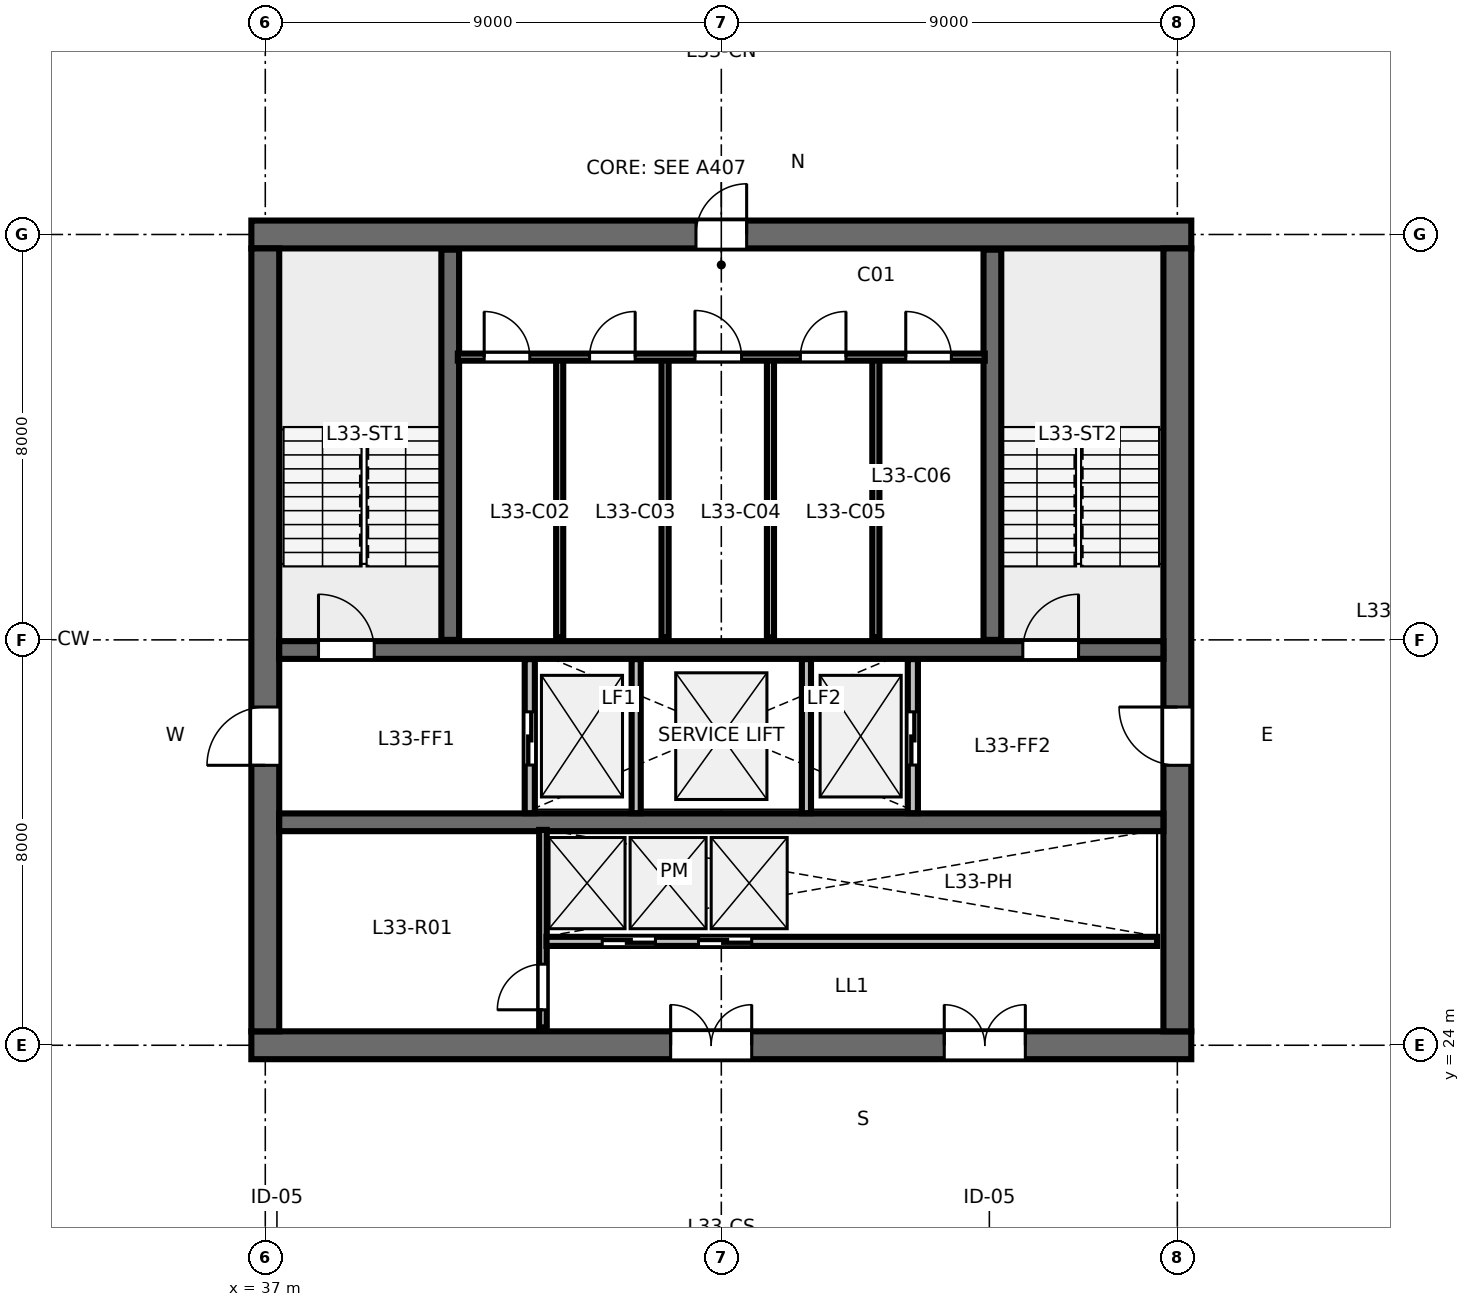
"""IFC4 building model, lengths in metres.
Left out: names, types, materials, properties, quantities, classifications, styles, units other than length and angle.
Written with IfcOpenShell. Run it as: python <this file> out.ifc"""

import sys

from ifc_helpers import new_model, si_unit, direction, frame, frame_2d, origin, place, context, subcontext, project, spatial, rectangle, extrude, element, fill, save


model = new_model("IFC4")
c1 = context("Model", 3, precision=1e-05, world=origin(), true_north=direction((0.0, 1.0)))
c2 = subcontext(c1, "Body", "Model", "MODEL_VIEW")
j1 = project(units=[si_unit("LENGTHUNIT", "METRE"), si_unit("PLANEANGLEUNIT", "RADIAN")], contexts=[c1])
p1 = place(None, origin())
s1 = spatial("IfcSite", under=j1, at=p1, CompositionType="ELEMENT")
p2 = place(p1, origin())
s2 = spatial("IfcBuilding", under=s1, at=p2, CompositionType="ELEMENT")
p3 = place(p2, frame((0.0, 0.0, 127.6)))
s3 = spatial("IfcBuildingStorey", under=s2, at=p3, CompositionType="ELEMENT", Elevation=127.6)
p4 = place(p3, frame((36.725, 24.0, 0.0), z_axis=(0.0, 0.0, 1.0), x_axis=(1.0, 0.0, 0.0)))
e1 = element("IfcWall", 1, at=p4, inside=s3, PredefinedType="SHEAR", context=c2, shape_type="SweptSolid", body=[
    extrude(rectangle(XDim=18.55, YDim=0.55, at=frame_2d((9.275, 0.0))), origin(), (0.0, 0.0, 1.0), 3.36),
])
p5 = place(p4, frame((8.275, 0.0, 0.0)))
e2 = element("IfcOpeningElement", 2, at=p5, cuts=e1, PredefinedType="OPENING", context=c2, shape_type="SweptSolid", body=[
    extrude(rectangle(XDim=1.6, YDim=2.15, at=frame_2d((0.8, 1.075))), frame((0.0, 0.285, 0.0), z_axis=(0.0, -1.0, 0.0), x_axis=(1.0, 0.0, 0.0)), (0.0, 0.0, 1.0), 0.57),
])
p6 = place(p4, frame((13.675, 0.0, 0.0)))
e3 = element("IfcOpeningElement", 3, at=p6, cuts=e1, PredefinedType="OPENING", context=c2, shape_type="SweptSolid", body=[
    extrude(rectangle(XDim=1.6, YDim=2.15, at=frame_2d((0.8, 1.075))), frame((0.0, 0.285, 0.0), z_axis=(0.0, -1.0, 0.0), x_axis=(1.0, 0.0, 0.0)), (0.0, 0.0, 1.0), 0.57),
])
p7 = place(p3, frame((36.725, 40.0, 0.0), z_axis=(0.0, 0.0, 1.0), x_axis=(1.0, 0.0, 0.0)))
e4 = element("IfcWall", 4, at=p7, inside=s3, PredefinedType="SHEAR", context=c2, shape_type="SweptSolid", body=[
    extrude(rectangle(XDim=18.55, YDim=0.55, at=frame_2d((9.275, 0.0))), origin(), (0.0, 0.0, 1.0), 3.36),
])
p8 = place(p7, frame((8.775, 0.0, 0.0)))
e5 = element("IfcOpeningElement", 5, at=p8, cuts=e4, PredefinedType="OPENING", context=c2, shape_type="SweptSolid", body=[
    extrude(rectangle(XDim=1.0, YDim=2.15, at=frame_2d((0.5, 1.075))), frame((0.0, 0.285, 0.0), z_axis=(0.0, -1.0, 0.0), x_axis=(1.0, 0.0, 0.0)), (0.0, 0.0, 1.0), 0.57),
])
p9 = place(p3, frame((37.0, 24.275, 0.0), z_axis=(0.0, 0.0, 1.0), x_axis=(0.0, 1.0, 0.0)))
e6 = element("IfcWall", 6, at=p9, inside=s3, PredefinedType="SHEAR", context=c2, shape_type="SweptSolid", body=[
    extrude(rectangle(XDim=15.45, YDim=0.55, at=frame_2d((7.725, 0.0))), origin(), (0.0, 0.0, 1.0), 3.36),
])
p10 = place(p9, frame((5.25, 0.0, 0.0)))
e7 = element("IfcOpeningElement", 7, at=p10, cuts=e6, PredefinedType="OPENING", context=c2, shape_type="SweptSolid", body=[
    extrude(rectangle(XDim=1.15, YDim=2.15, at=frame_2d((0.575, 1.075))), frame((0.0, 0.285, 0.0), z_axis=(0.0, -1.0, 0.0), x_axis=(1.0, 0.0, 0.0)), (0.0, 0.0, 1.0), 0.57),
])
p11 = place(p3, frame((55.0, 24.275, 0.0), z_axis=(0.0, 0.0, 1.0), x_axis=(0.0, 1.0, 0.0)))
e8 = element("IfcWall", 8, at=p11, inside=s3, PredefinedType="SHEAR", context=c2, shape_type="SweptSolid", body=[
    extrude(rectangle(XDim=15.45, YDim=0.55, at=frame_2d((7.725, 0.0))), origin(), (0.0, 0.0, 1.0), 3.36),
])
p12 = place(p11, frame((5.25, 0.0, 0.0)))
e9 = element("IfcOpeningElement", 9, at=p12, cuts=e8, PredefinedType="OPENING", context=c2, shape_type="SweptSolid", body=[
    extrude(rectangle(XDim=1.15, YDim=2.15, at=frame_2d((0.575, 1.075))), frame((0.0, 0.285, 0.0), z_axis=(0.0, -1.0, 0.0), x_axis=(1.0, 0.0, 0.0)), (0.0, 0.0, 1.0), 0.57),
])
p13 = place(p3, frame((37.275, 31.8, 0.0), z_axis=(0.0, 0.0, 1.0), x_axis=(1.0, 0.0, 0.0)))
e10 = element("IfcWall", 10, at=p13, inside=s3, PredefinedType="SHEAR", context=c2, shape_type="SweptSolid", body=[
    extrude(rectangle(XDim=17.45, YDim=0.35, at=frame_2d((8.725, 0.0))), origin(), (0.0, 0.0, 1.0), 3.36),
])
p14 = place(p13, frame((0.775, 0.0, 0.0)))
e11 = element("IfcOpeningElement", 11, at=p14, cuts=e10, PredefinedType="OPENING", context=c2, shape_type="SweptSolid", body=[
    extrude(rectangle(XDim=1.1, YDim=2.15, at=frame_2d((0.55, 1.075))), frame((0.0, 0.185, 0.0), z_axis=(0.0, -1.0, 0.0), x_axis=(1.0, 0.0, 0.0)), (0.0, 0.0, 1.0), 0.37),
])
p15 = place(p13, frame((14.675, 0.0, 0.0)))
e12 = element("IfcOpeningElement", 12, at=p15, cuts=e10, PredefinedType="OPENING", context=c2, shape_type="SweptSolid", body=[
    extrude(rectangle(XDim=1.1, YDim=2.15, at=frame_2d((0.55, 1.075))), frame((0.0, 0.185, 0.0), z_axis=(0.0, -1.0, 0.0), x_axis=(1.0, 0.0, 0.0)), (0.0, 0.0, 1.0), 0.37),
])
p16 = place(p3, frame((37.275, 28.4, 0.0), z_axis=(0.0, 0.0, 1.0), x_axis=(1.0, 0.0, 0.0)))
e13 = element("IfcWall", 13, at=p16, inside=s3, PredefinedType="SHEAR", context=c2, shape_type="SweptSolid", body=[
    extrude(rectangle(XDim=17.45, YDim=0.35, at=frame_2d((8.725, 0.0))), origin(), (0.0, 0.0, 1.0), 3.36),
])
for number, where, z_axis, x_axis in (
    (14, (40.65, 32.0, 0.0), (0.0, 0.0, 1.0), (0.0, 1.0, 0.0)),
    (15, (51.35, 32.0, 0.0), (0.0, 0.0, 1.0), (0.0, 1.0, 0.0)),
):
    element("IfcWall", number, at=place(p3, frame(where, z_axis=z_axis, x_axis=x_axis)), inside=s3, PredefinedType="SHEAR", context=c2, shape_type="SweptSolid", body=[
        extrude(rectangle(XDim=7.7, YDim=0.35, at=frame_2d((3.85, 0.0))), origin(), (0.0, 0.0, 1.0), 3.6),
    ])
for number, where, z_axis, x_axis in (
    (16, (42.81, 32.05, 0.0), (0.0, 0.0, 1.0), (0.0, 1.0, 0.0)),
    (17, (44.89, 32.05, 0.0), (0.0, 0.0, 1.0), (0.0, 1.0, 0.0)),
    (18, (46.97, 32.05, 0.0), (0.0, 0.0, 1.0), (0.0, 1.0, 0.0)),
    (19, (49.05, 32.05, 0.0), (0.0, 0.0, 1.0), (0.0, 1.0, 0.0)),
):
    element("IfcWall", number, at=place(p3, frame(where, z_axis=z_axis, x_axis=x_axis)), inside=s3, PredefinedType="PARTITIONING", context=c2, shape_type="SweptSolid", body=[
        extrude(rectangle(XDim=5.5, YDim=0.14, at=frame_2d((2.75, 0.0))), origin(), (0.0, 0.0, 1.0), 3.36),
    ])
p17 = place(p3, frame((40.8, 37.58, 0.0), z_axis=(0.0, 0.0, 1.0), x_axis=(1.0, 0.0, 0.0)))
e20 = element("IfcWall", 20, at=p17, inside=s3, PredefinedType="PARTITIONING", context=c2, shape_type="SweptSolid", body=[
    extrude(rectangle(XDim=10.4, YDim=0.14, at=frame_2d((5.2, 0.0))), origin(), (0.0, 0.0, 1.0), 3.36),
])
p18 = place(p17, frame((0.52, 0.0, 0.0)))
e21 = element("IfcOpeningElement", 21, at=p18, cuts=e20, PredefinedType="OPENING", context=c2, shape_type="SweptSolid", body=[
    extrude(rectangle(XDim=0.9, YDim=2.15, at=frame_2d((0.45, 1.075))), frame((0.0, 0.08, 0.0), z_axis=(0.0, -1.0, 0.0), x_axis=(1.0, 0.0, 0.0)), (0.0, 0.0, 1.0), 0.16),
])
p19 = place(p17, frame((2.6, 0.0, 0.0)))
e22 = element("IfcOpeningElement", 22, at=p19, cuts=e20, PredefinedType="OPENING", context=c2, shape_type="SweptSolid", body=[
    extrude(rectangle(XDim=0.9, YDim=2.15, at=frame_2d((0.45, 1.075))), frame((0.0, 0.08, 0.0), z_axis=(0.0, -1.0, 0.0), x_axis=(1.0, 0.0, 0.0)), (0.0, 0.0, 1.0), 0.16),
])
p20 = place(p17, frame((4.68, 0.0, 0.0)))
e23 = element("IfcOpeningElement", 23, at=p20, cuts=e20, PredefinedType="OPENING", context=c2, shape_type="SweptSolid", body=[
    extrude(rectangle(XDim=0.92, YDim=2.15, at=frame_2d((0.46, 1.075))), frame((0.0, 0.08, 0.0), z_axis=(0.0, -1.0, 0.0), x_axis=(1.0, 0.0, 0.0)), (0.0, 0.0, 1.0), 0.16),
])
p21 = place(p17, frame((6.76, 0.0, 0.0)))
e24 = element("IfcOpeningElement", 24, at=p21, cuts=e20, PredefinedType="OPENING", context=c2, shape_type="SweptSolid", body=[
    extrude(rectangle(XDim=0.9, YDim=2.15, at=frame_2d((0.45, 1.075))), frame((0.0, 0.08, 0.0), z_axis=(0.0, -1.0, 0.0), x_axis=(1.0, 0.0, 0.0)), (0.0, 0.0, 1.0), 0.16),
])
p22 = place(p17, frame((8.84, 0.0, 0.0)))
e25 = element("IfcOpeningElement", 25, at=p22, cuts=e20, PredefinedType="OPENING", context=c2, shape_type="SweptSolid", body=[
    extrude(rectangle(XDim=0.9, YDim=2.15, at=frame_2d((0.45, 1.075))), frame((0.0, 0.08, 0.0), z_axis=(0.0, -1.0, 0.0), x_axis=(1.0, 0.0, 0.0)), (0.0, 0.0, 1.0), 0.16),
])
p23 = place(p3, frame((42.22, 28.58, 0.0), z_axis=(0.0, 0.0, 1.0), x_axis=(0.0, 1.0, 0.0)))
e26 = element("IfcWall", 26, at=p23, inside=s3, PredefinedType="PARTITIONING", context=c2, shape_type="SweptSolid", body=[
    extrude(rectangle(XDim=3.04, YDim=0.2, at=frame_2d((1.52, 0.0))), origin(), (0.0, 0.0, 1.0), 3.36),
])
p24 = place(p23, frame((0.95, 0.0, 0.0)))
e27 = element("IfcOpeningElement", 27, at=p24, cuts=e26, PredefinedType="OPENING", context=c2, shape_type="SweptSolid", body=[
    extrude(rectangle(XDim=1.05, YDim=2.15, at=frame_2d((0.525, 1.075))), frame((0.0, 0.11, 0.0), z_axis=(0.0, -1.0, 0.0), x_axis=(1.0, 0.0, 0.0)), (0.0, 0.0, 1.0), 0.22),
])
p25 = place(p3, frame((49.78, 28.58, 0.0), z_axis=(0.0, 0.0, 1.0), x_axis=(0.0, 1.0, 0.0)))
e28 = element("IfcWall", 28, at=p25, inside=s3, PredefinedType="PARTITIONING", context=c2, shape_type="SweptSolid", body=[
    extrude(rectangle(XDim=3.04, YDim=0.2, at=frame_2d((1.52, 0.0))), origin(), (0.0, 0.0, 1.0), 3.36),
])
p26 = place(p25, frame((0.95, 0.0, 0.0)))
e29 = element("IfcOpeningElement", 29, at=p26, cuts=e28, PredefinedType="OPENING", context=c2, shape_type="SweptSolid", body=[
    extrude(rectangle(XDim=1.05, YDim=2.15, at=frame_2d((0.525, 1.075))), frame((0.0, 0.11, 0.0), z_axis=(0.0, -1.0, 0.0), x_axis=(1.0, 0.0, 0.0)), (0.0, 0.0, 1.0), 0.22),
])
for number, where, z_axis, x_axis in (
    (30, (44.32, 28.58, 0.0), (0.0, 0.0, 1.0), (0.0, 1.0, 0.0)),
    (31, (47.68, 28.58, 0.0), (0.0, 0.0, 1.0), (0.0, 1.0, 0.0)),
):
    element("IfcWall", number, at=place(p3, frame(where, z_axis=z_axis, x_axis=x_axis)), inside=s3, PredefinedType="PARTITIONING", context=c2, shape_type="SweptSolid", body=[
        extrude(rectangle(XDim=3.04, YDim=0.18, at=frame_2d((1.52, 0.0))), origin(), (0.0, 0.0, 1.0), 3.36),
    ])
p27 = place(p3, frame((42.48, 24.35, 0.0), z_axis=(0.0, 0.0, 1.0), x_axis=(0.0, 1.0, 0.0)))
e32 = element("IfcWall", 32, at=p27, inside=s3, PredefinedType="PARTITIONING", context=c2, shape_type="SweptSolid", body=[
    extrude(rectangle(XDim=3.9, YDim=0.15, at=frame_2d((1.95, 0.0))), origin(), (0.0, 0.0, 1.0), 3.36),
])
p28 = place(p27, frame((0.35, 0.0, 0.0)))
e33 = element("IfcOpeningElement", 33, at=p28, cuts=e32, PredefinedType="OPENING", context=c2, shape_type="SweptSolid", body=[
    extrude(rectangle(XDim=0.9, YDim=2.15, at=frame_2d((0.45, 1.075))), frame((0.0, 0.085, 0.0), z_axis=(0.0, -1.0, 0.0), x_axis=(1.0, 0.0, 0.0)), (0.0, 0.0, 1.0), 0.17),
])
p29 = place(p3, frame((42.55, 26.05, 0.0), z_axis=(0.0, 0.0, 1.0), x_axis=(1.0, 0.0, 0.0)))
e34 = element("IfcWall", 34, at=p29, inside=s3, PredefinedType="PARTITIONING", context=c2, shape_type="SweptSolid", body=[
    extrude(rectangle(XDim=12.05, YDim=0.18, at=frame_2d((6.025, 0.0))), origin(), (0.0, 0.0, 1.0), 3.36),
])
p30 = place(p29, frame((1.1, 0.0, 0.0)))
e35 = element("IfcOpeningElement", 35, at=p30, cuts=e34, PredefinedType="OPENING", context=c2, shape_type="SweptSolid", body=[
    extrude(rectangle(XDim=1.05, YDim=2.15, at=frame_2d((0.525, 1.075))), frame((0.0, 0.1, 0.0), z_axis=(0.0, -1.0, 0.0), x_axis=(1.0, 0.0, 0.0)), (0.0, 0.0, 1.0), 0.2),
])
p31 = place(p29, frame((3.0, 0.0, 0.0)))
e36 = element("IfcOpeningElement", 36, at=p31, cuts=e34, PredefinedType="OPENING", context=c2, shape_type="SweptSolid", body=[
    extrude(rectangle(XDim=1.05, YDim=2.15, at=frame_2d((0.525, 1.075))), frame((0.0, 0.1, 0.0), z_axis=(0.0, -1.0, 0.0), x_axis=(1.0, 0.0, 0.0)), (0.0, 0.0, 1.0), 0.2),
])
p32 = place(p14, origin())
e37 = element("IfcDoor", 37, at=p32, inside=s3, OperationType="SINGLE_SWING_LEFT", PredefinedType="DOOR", context=c2, shape_type="SweptSolid", body=[
    extrude(rectangle(XDim=1.1, YDim=2.15, at=frame_2d((0.55, 1.075))), frame((0.0, 0.025, 0.0), z_axis=(0.0, -1.0, 0.0), x_axis=(1.0, 0.0, 0.0)), (0.0, 0.0, 1.0), 0.05),
])
fill(e11, e37)
p33 = place(p15, origin())
e38 = element("IfcDoor", 38, at=p33, inside=s3, OperationType="SINGLE_SWING_RIGHT", PredefinedType="DOOR", context=c2, shape_type="SweptSolid", body=[
    extrude(rectangle(XDim=1.1, YDim=2.15, at=frame_2d((0.55, 1.075))), frame((0.0, 0.025, 0.0), z_axis=(0.0, -1.0, 0.0), x_axis=(1.0, 0.0, 0.0)), (0.0, 0.0, 1.0), 0.05),
])
fill(e12, e38)
p34 = place(p8, origin())
e39 = element("IfcDoor", 39, at=p34, inside=s3, OperationType="SINGLE_SWING_RIGHT", PredefinedType="DOOR", context=c2, shape_type="SweptSolid", body=[
    extrude(rectangle(XDim=1.0, YDim=2.15, at=frame_2d((0.5, 1.075))), frame((0.0, 0.025, 0.0), z_axis=(0.0, -1.0, 0.0), x_axis=(1.0, 0.0, 0.0)), (0.0, 0.0, 1.0), 0.05),
])
fill(e5, e39)
p35 = place(p10, origin())
e40 = element("IfcDoor", 40, at=p35, inside=s3, OperationType="SINGLE_SWING_LEFT", PredefinedType="DOOR", context=c2, shape_type="SweptSolid", body=[
    extrude(rectangle(XDim=1.15, YDim=2.15, at=frame_2d((0.575, 1.075))), frame((0.0, 0.025, 0.0), z_axis=(0.0, -1.0, 0.0), x_axis=(1.0, 0.0, 0.0)), (0.0, 0.0, 1.0), 0.05),
])
fill(e7, e40)
p36 = place(p12, origin())
e41 = element("IfcDoor", 41, at=p36, inside=s3, OperationType="SINGLE_SWING_RIGHT", PredefinedType="DOOR", context=c2, shape_type="SweptSolid", body=[
    extrude(rectangle(XDim=1.15, YDim=2.15, at=frame_2d((0.575, 1.075))), frame((0.0, 0.025, 0.0), z_axis=(0.0, -1.0, 0.0), x_axis=(1.0, 0.0, 0.0)), (0.0, 0.0, 1.0), 0.05),
])
fill(e9, e41)
p37 = place(p5, origin())
e42 = element("IfcDoor", 42, at=p37, inside=s3, OperationType="DOUBLE_DOOR_SINGLE_SWING", PredefinedType="DOOR", context=c2, shape_type="SweptSolid", body=[
    extrude(rectangle(XDim=1.6, YDim=2.15, at=frame_2d((0.8, 1.075))), frame((0.0, 0.025, 0.0), z_axis=(0.0, -1.0, 0.0), x_axis=(1.0, 0.0, 0.0)), (0.0, 0.0, 1.0), 0.05),
])
fill(e2, e42)
p38 = place(p6, origin())
e43 = element("IfcDoor", 43, at=p38, inside=s3, OperationType="DOUBLE_DOOR_SINGLE_SWING", PredefinedType="DOOR", context=c2, shape_type="SweptSolid", body=[
    extrude(rectangle(XDim=1.6, YDim=2.15, at=frame_2d((0.8, 1.075))), frame((0.0, 0.025, 0.0), z_axis=(0.0, -1.0, 0.0), x_axis=(1.0, 0.0, 0.0)), (0.0, 0.0, 1.0), 0.05),
])
fill(e3, e43)
p39 = place(p18, origin())
e44 = element("IfcDoor", 44, at=p39, inside=s3, OperationType="SINGLE_SWING_LEFT", PredefinedType="DOOR", context=c2, shape_type="SweptSolid", body=[
    extrude(rectangle(XDim=0.9, YDim=2.15, at=frame_2d((0.45, 1.075))), frame((0.0, 0.025, 0.0), z_axis=(0.0, -1.0, 0.0), x_axis=(1.0, 0.0, 0.0)), (0.0, 0.0, 1.0), 0.05),
])
fill(e21, e44)
p40 = place(p19, origin())
e45 = element("IfcDoor", 45, at=p40, inside=s3, OperationType="SINGLE_SWING_RIGHT", PredefinedType="DOOR", context=c2, shape_type="SweptSolid", body=[
    extrude(rectangle(XDim=0.9, YDim=2.15, at=frame_2d((0.45, 1.075))), frame((0.0, 0.025, 0.0), z_axis=(0.0, -1.0, 0.0), x_axis=(1.0, 0.0, 0.0)), (0.0, 0.0, 1.0), 0.05),
])
fill(e22, e45)
p41 = place(p20, origin())
e46 = element("IfcDoor", 46, at=p41, inside=s3, OperationType="SINGLE_SWING_LEFT", PredefinedType="DOOR", context=c2, shape_type="SweptSolid", body=[
    extrude(rectangle(XDim=0.92, YDim=2.15, at=frame_2d((0.46, 1.075))), frame((0.0, 0.025, 0.0), z_axis=(0.0, -1.0, 0.0), x_axis=(1.0, 0.0, 0.0)), (0.0, 0.0, 1.0), 0.05),
])
fill(e23, e46)
p42 = place(p21, origin())
e47 = element("IfcDoor", 47, at=p42, inside=s3, OperationType="SINGLE_SWING_RIGHT", PredefinedType="DOOR", context=c2, shape_type="SweptSolid", body=[
    extrude(rectangle(XDim=0.9, YDim=2.15, at=frame_2d((0.45, 1.075))), frame((0.0, 0.025, 0.0), z_axis=(0.0, -1.0, 0.0), x_axis=(1.0, 0.0, 0.0)), (0.0, 0.0, 1.0), 0.05),
])
fill(e24, e47)
p43 = place(p22, origin())
e48 = element("IfcDoor", 48, at=p43, inside=s3, OperationType="SINGLE_SWING_LEFT", PredefinedType="DOOR", context=c2, shape_type="SweptSolid", body=[
    extrude(rectangle(XDim=0.9, YDim=2.15, at=frame_2d((0.45, 1.075))), frame((0.0, 0.025, 0.0), z_axis=(0.0, -1.0, 0.0), x_axis=(1.0, 0.0, 0.0)), (0.0, 0.0, 1.0), 0.05),
])
fill(e25, e48)
p44 = place(p24, origin())
e49 = element("IfcDoor", 49, at=p44, inside=s3, OperationType="SLIDING_TO_LEFT", PredefinedType="DOOR", context=c2, shape_type="SweptSolid", body=[
    extrude(rectangle(XDim=1.05, YDim=2.15, at=frame_2d((0.525, 1.075))), frame((0.0, 0.025, 0.0), z_axis=(0.0, -1.0, 0.0), x_axis=(1.0, 0.0, 0.0)), (0.0, 0.0, 1.0), 0.05),
])
fill(e27, e49)
p45 = place(p26, origin())
e50 = element("IfcDoor", 50, at=p45, inside=s3, OperationType="SLIDING_TO_RIGHT", PredefinedType="DOOR", context=c2, shape_type="SweptSolid", body=[
    extrude(rectangle(XDim=1.05, YDim=2.15, at=frame_2d((0.525, 1.075))), frame((0.0, 0.025, 0.0), z_axis=(0.0, -1.0, 0.0), x_axis=(1.0, 0.0, 0.0)), (0.0, 0.0, 1.0), 0.05),
])
fill(e29, e50)
p46 = place(p28, origin())
e51 = element("IfcDoor", 51, at=p46, inside=s3, OperationType="SINGLE_SWING_LEFT", PredefinedType="DOOR", context=c2, shape_type="SweptSolid", body=[
    extrude(rectangle(XDim=0.9, YDim=2.15, at=frame_2d((0.45, 1.075))), frame((0.0, 0.025, 0.0), z_axis=(0.0, -1.0, 0.0), x_axis=(1.0, 0.0, 0.0)), (0.0, 0.0, 1.0), 0.05),
])
fill(e33, e51)
p47 = place(p30, origin())
e52 = element("IfcDoor", 52, at=p47, inside=s3, OperationType="SLIDING_TO_LEFT", PredefinedType="DOOR", context=c2, shape_type="SweptSolid", body=[
    extrude(rectangle(XDim=1.05, YDim=2.15, at=frame_2d((0.525, 1.075))), frame((0.0, 0.025, 0.0), z_axis=(0.0, -1.0, 0.0), x_axis=(1.0, 0.0, 0.0)), (0.0, 0.0, 1.0), 0.05),
])
fill(e35, e52)
p48 = place(p31, origin())
e53 = element("IfcDoor", 53, at=p48, inside=s3, OperationType="SLIDING_TO_RIGHT", PredefinedType="DOOR", context=c2, shape_type="SweptSolid", body=[
    extrude(rectangle(XDim=1.05, YDim=2.15, at=frame_2d((0.525, 1.075))), frame((0.0, 0.025, 0.0), z_axis=(0.0, -1.0, 0.0), x_axis=(1.0, 0.0, 0.0)), (0.0, 0.0, 1.0), 0.05),
])
fill(e36, e53)
save(model, sys.argv[1])
